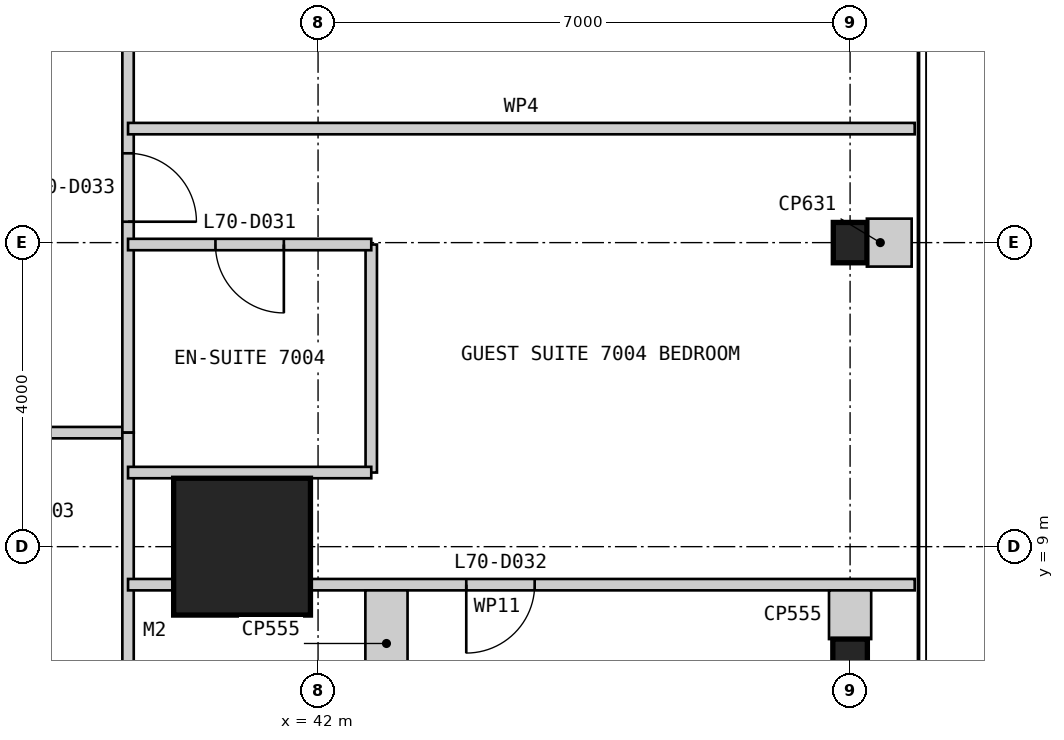
"""IFC4 building model, lengths in metres.
Left out: names, types, materials, properties, quantities, classifications, styles, units other than length and angle.
Written with IfcOpenShell. Run it as: python <this file> out.ifc"""

import sys

from ifc_helpers import new_model, si_unit, direction, frame, frame_2d, origin, origin_2d, place, context, subcontext, project, spatial, rectangle, i_section, extrude, element, fill, save


model = new_model("IFC4")
c1 = context("Model", 3, precision=1e-05, world=origin(), true_north=direction((0.0, 1.0)))
c2 = subcontext(c1, "Body", "Model", "MODEL_VIEW")
j1 = project(units=[si_unit("LENGTHUNIT", "METRE"), si_unit("PLANEANGLEUNIT", "RADIAN")], contexts=[c1])
p1 = place(None, origin())
s1 = spatial("IfcSite", under=j1, at=p1, CompositionType="ELEMENT")
p2 = place(p1, origin())
s2 = spatial("IfcBuilding", under=s1, at=p2, CompositionType="ELEMENT")
p3 = place(p2, frame((0.0, 0.0, 290.0)))
s3 = spatial("IfcBuildingStorey", under=s2, at=p3, CompositionType="ELEMENT", Elevation=290.0)
p4 = place(p3, frame((41.0, 9.0, 0.0), z_axis=(0.0, 0.0, 1.0), x_axis=(1.0, 0.0, 0.0)))
e1 = element("IfcColumn", 1, at=p4, inside=s3, PredefinedType="COLUMN", context=c2, shape_type="SweptSolid", body=[
    extrude(rectangle(XDim=1.8, YDim=1.8, at=origin_2d()), origin(), (0.0, 0.0, 1.0), 3.4),
])
p5 = place(p3, frame((49.0, 7.5, 0.0), z_axis=(0.0, 0.0, 1.0), x_axis=(1.0, 0.0, 0.0)))
e2 = element("IfcColumn", 2, at=p5, inside=s3, PredefinedType="COLUMN", context=c2, shape_type="SweptSolid", body=[
    extrude(i_section(OverallWidth=0.455, OverallDepth=0.569, WebThickness=0.078, FlangeThickness=0.125, at=origin_2d()), origin(), (0.0, 0.0, 1.0), 3.4),
])
p6 = place(p3, frame((49.0, 13.0, 0.0), z_axis=(0.0, 0.0, 1.0), x_axis=(1.0, 0.0, 0.0)))
e3 = element("IfcColumn", 3, at=p6, inside=s3, PredefinedType="COLUMN", context=c2, shape_type="SweptSolid", body=[
    extrude(i_section(OverallWidth=0.442, OverallDepth=0.531, WebThickness=0.066, FlangeThickness=0.106, at=origin_2d()), origin(), (0.0, 0.0, 1.0), 3.4),
])
p7 = place(p3, frame((10.5, 10.5, 0.0), z_axis=(0.0, 0.0, 1.0), x_axis=(1.0, 0.0, 0.0)))
e4 = element("IfcWall", 4, at=p7, inside=s3, PredefinedType="PARTITIONING", context=c2, shape_type="SweptSolid", body=[
    extrude(rectangle(XDim=29.0, YDim=0.15, at=frame_2d((14.5, 0.0))), origin(), (0.0, 0.0, 1.0), 3.25),
])
p8 = place(p7, frame((1.85, 0.0, 0.0)))
e5 = element("IfcOpeningElement", 5, at=p8, cuts=e4, PredefinedType="OPENING", context=c2, shape_type="SweptSolid", body=[
    extrude(rectangle(XDim=0.9, YDim=2.1, at=frame_2d((0.45, 1.05))), frame((0.0, 0.085, 0.0), z_axis=(0.0, -1.0, 0.0), x_axis=(1.0, 0.0, 0.0)), (0.0, 0.0, 1.0), 0.17),
])
p9 = place(p7, frame((11.5, 0.0, 0.0)))
e6 = element("IfcOpeningElement", 6, at=p9, cuts=e4, PredefinedType="OPENING", context=c2, shape_type="SweptSolid", body=[
    extrude(rectangle(XDim=0.9, YDim=2.1, at=frame_2d((0.45, 1.05))), frame((0.0, 0.085, 0.0), z_axis=(0.0, -1.0, 0.0), x_axis=(1.0, 0.0, 0.0)), (0.0, 0.0, 1.0), 0.17),
])
p10 = place(p7, frame((24.1, 0.0, 0.0)))
e7 = element("IfcOpeningElement", 7, at=p10, cuts=e4, PredefinedType="OPENING", context=c2, shape_type="SweptSolid", body=[
    extrude(rectangle(XDim=0.9, YDim=2.1, at=frame_2d((0.45, 1.05))), frame((0.0, 0.085, 0.0), z_axis=(0.0, -1.0, 0.0), x_axis=(1.0, 0.0, 0.0)), (0.0, 0.0, 1.0), 0.17),
])
p11 = place(p3, frame((39.5, 10.5, 0.0), z_axis=(0.0, 0.0, 1.0), x_axis=(0.0, 1.0, 0.0)))
e8 = element("IfcWall", 8, at=p11, inside=s3, PredefinedType="PARTITIONING", context=c2, shape_type="SweptSolid", body=[
    extrude(rectangle(XDim=29.0, YDim=0.15, at=frame_2d((14.5, 0.0))), origin(), (0.0, 0.0, 1.0), 3.25),
])
p12 = place(p11, frame((2.775, 0.0, 0.0)))
e9 = element("IfcOpeningElement", 9, at=p12, cuts=e8, PredefinedType="OPENING", context=c2, shape_type="SweptSolid", body=[
    extrude(rectangle(XDim=0.9, YDim=2.1, at=frame_2d((0.45, 1.05))), frame((0.0, 0.085, 0.0), z_axis=(0.0, -1.0, 0.0), x_axis=(1.0, 0.0, 0.0)), (0.0, 0.0, 1.0), 0.17),
])
p13 = place(p11, frame((11.1, 0.0, 0.0)))
e10 = element("IfcOpeningElement", 10, at=p13, cuts=e8, PredefinedType="OPENING", context=c2, shape_type="SweptSolid", body=[
    extrude(rectangle(XDim=0.9, YDim=2.1, at=frame_2d((0.45, 1.05))), frame((0.0, 0.085, 0.0), z_axis=(0.0, -1.0, 0.0), x_axis=(1.0, 0.0, 0.0)), (0.0, 0.0, 1.0), 0.17),
])
p14 = place(p11, frame((17.2, 0.0, 0.0)))
e11 = element("IfcOpeningElement", 11, at=p14, cuts=e8, PredefinedType="OPENING", context=c2, shape_type="SweptSolid", body=[
    extrude(rectangle(XDim=1.0, YDim=2.1, at=frame_2d((0.5, 1.05))), frame((0.0, 0.085, 0.0), z_axis=(0.0, -1.0, 0.0), x_axis=(1.0, 0.0, 0.0)), (0.0, 0.0, 1.0), 0.17),
])
p15 = place(p11, frame((24.5, 0.0, 0.0)))
e12 = element("IfcOpeningElement", 12, at=p15, cuts=e8, PredefinedType="OPENING", context=c2, shape_type="SweptSolid", body=[
    extrude(rectangle(XDim=0.9, YDim=2.1, at=frame_2d((0.45, 1.05))), frame((0.0, 0.085, 0.0), z_axis=(0.0, -1.0, 0.0), x_axis=(1.0, 0.0, 0.0)), (0.0, 0.0, 1.0), 0.17),
])
p16 = place(p3, frame((39.5, 0.15, 0.0), z_axis=(0.0, 0.0, 1.0), x_axis=(0.0, 1.0, 0.0)))
e13 = element("IfcWall", 13, at=p16, inside=s3, PredefinedType="PARTITIONING", context=c2, shape_type="SweptSolid", body=[
    extrude(rectangle(XDim=10.35, YDim=0.15, at=frame_2d((5.175, 0.0))), origin(), (0.0, 0.0, 1.0), 3.25),
])
p17 = place(p3, frame((42.7, 9.975, 0.0), z_axis=(0.0, 0.0, 1.0), x_axis=(0.0, 1.0, 0.0)))
e14 = element("IfcWall", 14, at=p17, inside=s3, PredefinedType="PARTITIONING", context=c2, shape_type="SweptSolid", body=[
    extrude(rectangle(XDim=3.0, YDim=0.15, at=frame_2d((1.5, 0.0))), origin(), (0.0, 0.0, 1.0), 3.25),
])
p18 = place(p3, frame((42.7, 12.975, 0.0), z_axis=(0.0, 0.0, 1.0), x_axis=(-1.0, 0.0, 0.0)))
e15 = element("IfcWall", 15, at=p18, inside=s3, PredefinedType="PARTITIONING", context=c2, shape_type="SweptSolid", body=[
    extrude(rectangle(XDim=3.2, YDim=0.15, at=frame_2d((1.6, 0.0))), origin(), (0.0, 0.0, 1.0), 2.404),
])
p19 = place(p18, frame((1.15, 0.0, 0.0)))
e16 = element("IfcOpeningElement", 16, at=p19, cuts=e15, PredefinedType="OPENING", context=c2, shape_type="SweptSolid", body=[
    extrude(rectangle(XDim=0.9, YDim=2.1, at=frame_2d((0.45, 1.05))), frame((0.0, 0.085, 0.0), z_axis=(0.0, -1.0, 0.0), x_axis=(1.0, 0.0, 0.0)), (0.0, 0.0, 1.0), 0.17),
])
p20 = place(p3, frame((42.7, 9.975, 0.0), z_axis=(0.0, 0.0, 1.0), x_axis=(-1.0, 0.0, 0.0)))
e17 = element("IfcWall", 17, at=p20, inside=s3, PredefinedType="PARTITIONING", context=c2, shape_type="SweptSolid", body=[
    extrude(rectangle(XDim=3.2, YDim=0.15, at=frame_2d((1.6, 0.0))), origin(), (0.0, 0.0, 1.0), 3.25),
])
p21 = place(p3, frame((49.85, 8.5, 0.0), z_axis=(0.0, 0.0, 1.0), x_axis=(-1.0, 0.0, 0.0)))
e18 = element("IfcWall", 18, at=p21, inside=s3, PredefinedType="PARTITIONING", context=c2, shape_type="SweptSolid", body=[
    extrude(rectangle(XDim=10.35, YDim=0.15, at=frame_2d((5.175, 0.0))), origin(), (0.0, 0.0, 1.0), 3.25),
])
p22 = place(p21, frame((5.0, 0.0, 0.0)))
e19 = element("IfcOpeningElement", 19, at=p22, cuts=e18, PredefinedType="OPENING", context=c2, shape_type="SweptSolid", body=[
    extrude(rectangle(XDim=0.9, YDim=2.1, at=frame_2d((0.45, 1.05))), frame((0.0, 0.085, 0.0), z_axis=(0.0, -1.0, 0.0), x_axis=(1.0, 0.0, 0.0)), (0.0, 0.0, 1.0), 0.17),
])
p23 = place(p3, frame((49.85, 14.5, 0.0), z_axis=(0.0, 0.0, 1.0), x_axis=(-1.0, 0.0, 0.0)))
e20 = element("IfcWall", 20, at=p23, inside=s3, PredefinedType="PARTITIONING", context=c2, shape_type="SweptSolid", body=[
    extrude(rectangle(XDim=10.35, YDim=0.15, at=frame_2d((5.175, 0.0))), origin(), (0.0, 0.0, 1.0), 3.25),
])
p24 = place(p3, frame((42.9, 8.425, 0.0), z_axis=(0.0, 0.0, 1.0), x_axis=(0.0, -1.0, 0.0)))
e21 = element("IfcWall", 21, at=p24, inside=s3, PredefinedType="PARTITIONING", context=c2, shape_type="SweptSolid", body=[
    extrude(rectangle(XDim=1.041, YDim=0.555, at=frame_2d((0.52, 0.0))), origin(), (0.0, 0.0, 1.0), 3.25),
])
p25 = place(p3, frame((49.0, 8.425, 0.0), z_axis=(0.0, 0.0, 1.0), x_axis=(0.0, -1.0, 0.0)))
e22 = element("IfcWall", 22, at=p25, inside=s3, PredefinedType="PARTITIONING", context=c2, shape_type="SweptSolid", body=[
    extrude(rectangle(XDim=0.641, YDim=0.555, at=frame_2d((0.32, 0.0))), origin(), (0.0, 0.0, 1.0), 2.338),
])
p26 = place(p3, frame((49.81, 13.0, 0.0), z_axis=(0.0, 0.0, 1.0), x_axis=(-1.0, 0.0, 0.0)))
e23 = element("IfcWall", 23, at=p26, inside=s3, PredefinedType="PARTITIONING", context=c2, shape_type="SweptSolid", body=[
    extrude(rectangle(XDim=0.589, YDim=0.631, at=frame_2d((0.294, 0.0))), origin(), (0.0, 0.0, 1.0), 3.25),
])
p27 = place(p19, origin())
e24 = element("IfcDoor", 24, at=p27, inside=s3, OperationType="SINGLE_SWING_LEFT", PredefinedType="DOOR", context=c2, shape_type="SweptSolid", body=[
    extrude(rectangle(XDim=0.9, YDim=2.1, at=frame_2d((0.45, 1.05))), frame((0.0, 0.025, 0.0), z_axis=(0.0, -1.0, 0.0), x_axis=(1.0, 0.0, 0.0)), (0.0, 0.0, 1.0), 0.05),
])
fill(e16, e24)
p28 = place(p22, origin())
e25 = element("IfcDoor", 25, at=p28, inside=s3, OperationType="SINGLE_SWING_RIGHT", PredefinedType="DOOR", context=c2, shape_type="SweptSolid", body=[
    extrude(rectangle(XDim=0.9, YDim=2.1, at=frame_2d((0.45, 1.05))), frame((0.0, 0.025, 0.0), z_axis=(0.0, -1.0, 0.0), x_axis=(1.0, 0.0, 0.0)), (0.0, 0.0, 1.0), 0.05),
])
fill(e19, e25)
p29 = place(p12, frame((0.9, 0.0, 0.0), z_axis=(0.0, 0.0, 1.0), x_axis=(-1.0, 0.0, 0.0)))
e26 = element("IfcDoor", 26, at=p29, inside=s3, OperationType="SINGLE_SWING_RIGHT", PredefinedType="DOOR", context=c2, shape_type="SweptSolid", body=[
    extrude(rectangle(XDim=0.9, YDim=2.1, at=frame_2d((0.45, 1.05))), frame((0.0, 0.025, 0.0), z_axis=(0.0, -1.0, 0.0), x_axis=(1.0, 0.0, 0.0)), (0.0, 0.0, 1.0), 0.05),
])
fill(e9, e26)
save(model, sys.argv[1])
